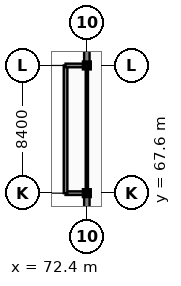
"""IFC4 building model, lengths in metres.
Left out: names, types, materials, properties, quantities, classifications, styles, units other than length and angle.
Written with IfcOpenShell. Run it as: python <this file> out.ifc"""

import sys

from ifc_helpers import new_model, si_unit, direction, frame, frame_2d, origin, origin_2d, place, context, subcontext, project, spatial, rectangle, extrude, element, fill, save


model = new_model("IFC4")
c1 = context("Model", 3, precision=1e-05, world=origin(), true_north=direction((0.0, 1.0)))
c2 = subcontext(c1, "Body", "Model", "MODEL_VIEW")
j1 = project(units=[si_unit("LENGTHUNIT", "METRE"), si_unit("PLANEANGLEUNIT", "RADIAN")], contexts=[c1])
p1 = place(None, origin())
s1 = spatial("IfcSite", under=j1, at=p1, CompositionType="ELEMENT")
p2 = place(p1, origin())
s2 = spatial("IfcBuilding", under=s1, at=p2, CompositionType="ELEMENT")
p3 = place(p2, frame((0.0, 0.0, 17.7)))
s3 = spatial("IfcBuildingStorey", under=s2, at=p3, CompositionType="ELEMENT", Elevation=17.7)
for number, where, z_axis, x_axis in (
    (1, (72.4, 67.6, 0.0), (0.0, 0.0, 1.0), (1.0, 0.0, 0.0)),
    (2, (72.4, 76.0, 0.0), (0.0, 0.0, 1.0), (1.0, 0.0, 0.0)),
):
    element("IfcColumn", number, at=place(p3, frame(where, z_axis=z_axis, x_axis=x_axis)), inside=s3, PredefinedType="COLUMN", context=c2, shape_type="SweptSolid", body=[
        extrude(rectangle(XDim=0.36, YDim=0.36, at=origin_2d()), origin(), (0.0, 0.0, 1.0), 3.9),
    ])
p4 = place(p3, frame((72.4, 67.6, 0.0), z_axis=(0.0, 0.0, 1.0), x_axis=(0.0, 1.0, 0.0)))
e3 = element("IfcWall", 3, at=p4, inside=s3, PredefinedType="PARTITIONING", context=c2, shape_type="SweptSolid", body=[
    extrude(rectangle(XDim=8.4, YDim=0.15, at=frame_2d((4.2, 0.0))), origin(), (0.0, 0.0, 1.0), 3.32),
])
p5 = place(p4, frame((3.7, 0.0, -0.01)))
e4 = element("IfcOpeningElement", 4, at=p5, cuts=e3, PredefinedType="OPENING", context=c2, shape_type="SweptSolid", body=[
    extrude(rectangle(XDim=1.0, YDim=2.16, at=frame_2d((0.5, 1.08))), frame((0.0, 0.085, 0.0), z_axis=(0.0, -1.0, 0.0), x_axis=(1.0, 0.0, 0.0)), (0.0, 0.0, 1.0), 0.17),
])
p6 = place(p3, frame((72.4, 67.6, 0.0), z_axis=(0.0, 0.0, 1.0), x_axis=(0.0, -1.0, 0.0)))
e5 = element("IfcWall", 5, at=p6, inside=s3, PredefinedType="SOLIDWALL", context=c2, shape_type="SweptSolid", body=[
    extrude(rectangle(XDim=8.4, YDim=0.36, at=frame_2d((4.2, 0.0))), origin(), (0.0, 0.0, 1.0), 3.32),
])
p7 = place(p6, frame((0.46, 0.0, 0.75)))
e6 = element("IfcOpeningElement", 6, at=p7, cuts=e5, PredefinedType="OPENING", context=c2, shape_type="SweptSolid", body=[
    extrude(rectangle(XDim=1.55, YDim=2.3, at=frame_2d((0.775, 1.15))), frame((0.0, 0.19, 0.0), z_axis=(0.0, -1.0, 0.0), x_axis=(1.0, 0.0, 0.0)), (0.0, 0.0, 1.0), 0.38),
])
p8 = place(p6, frame((6.26, 0.0, 0.75)))
e7 = element("IfcOpeningElement", 7, at=p8, cuts=e5, PredefinedType="OPENING", context=c2, shape_type="SweptSolid", body=[
    extrude(rectangle(XDim=1.55, YDim=2.3, at=frame_2d((0.775, 1.15))), frame((0.0, 0.19, 0.0), z_axis=(0.0, -1.0, 0.0), x_axis=(1.0, 0.0, 0.0)), (0.0, 0.0, 1.0), 0.38),
])
p9 = place(p3, frame((72.4, 80.8, 0.0), z_axis=(0.0, 0.0, 1.0), x_axis=(0.0, -1.0, 0.0)))
e8 = element("IfcWall", 8, at=p9, inside=s3, PredefinedType="SOLIDWALL", context=c2, shape_type="SweptSolid", body=[
    extrude(rectangle(XDim=4.8, YDim=0.36, at=frame_2d((2.4, 0.0))), origin(), (0.0, 0.0, 1.0), 3.32),
])
p10 = place(p9, frame((0.46, 0.0, 0.75)))
e9 = element("IfcOpeningElement", 9, at=p10, cuts=e8, PredefinedType="OPENING", context=c2, shape_type="SweptSolid", body=[
    extrude(rectangle(XDim=1.55, YDim=2.3, at=frame_2d((0.775, 1.15))), frame((0.0, 0.19, 0.0), z_axis=(0.0, -1.0, 0.0), x_axis=(1.0, 0.0, 0.0)), (0.0, 0.0, 1.0), 0.38),
])
p11 = place(p9, frame((2.66, 0.0, 0.75)))
e10 = element("IfcOpeningElement", 10, at=p11, cuts=e8, PredefinedType="OPENING", context=c2, shape_type="SweptSolid", body=[
    extrude(rectangle(XDim=1.55, YDim=2.3, at=frame_2d((0.775, 1.15))), frame((0.0, 0.19, 0.0), z_axis=(0.0, -1.0, 0.0), x_axis=(1.0, 0.0, 0.0)), (0.0, 0.0, 1.0), 0.38),
])
p12 = place(p3, frame((72.25, 67.6, 0.0), z_axis=(0.0, 0.0, 1.0), x_axis=(-1.0, 0.0, 0.0)))
e11 = element("IfcWall", 11, at=p12, inside=s3, PredefinedType="SOLIDWALL", context=c2, shape_type="SweptSolid", body=[
    extrude(rectangle(XDim=1.25, YDim=0.24, at=frame_2d((0.625, 0.0))), origin(), (0.0, 0.0, 1.0), 3.32),
])
p13 = place(p3, frame((71.0, 67.6, 0.0), z_axis=(0.0, 0.0, 1.0), x_axis=(0.0, 1.0, 0.0)))
e12 = element("IfcWall", 12, at=p13, inside=s3, PredefinedType="SOLIDWALL", context=c2, shape_type="SweptSolid", body=[
    extrude(rectangle(XDim=8.4, YDim=0.24, at=frame_2d((4.2, 0.0))), origin(), (0.0, 0.0, 1.0), 3.32),
])
p14 = place(p13, frame((0.46, 0.0, 0.65)))
e13 = element("IfcOpeningElement", 13, at=p14, cuts=e12, PredefinedType="OPENING", context=c2, shape_type="SweptSolid", body=[
    extrude(rectangle(XDim=2.4, YDim=2.1, at=frame_2d((1.2, 1.05))), frame((0.0, 0.13, 0.0), z_axis=(0.0, -1.0, 0.0), x_axis=(1.0, 0.0, 0.0)), (0.0, 0.0, 1.0), 0.26),
])
p15 = place(p13, frame((5.46, 0.0, 0.65)))
e14 = element("IfcOpeningElement", 14, at=p15, cuts=e12, PredefinedType="OPENING", context=c2, shape_type="SweptSolid", body=[
    extrude(rectangle(XDim=2.4, YDim=2.1, at=frame_2d((1.2, 1.05))), frame((0.0, 0.13, 0.0), z_axis=(0.0, -1.0, 0.0), x_axis=(1.0, 0.0, 0.0)), (0.0, 0.0, 1.0), 0.26),
])
p16 = place(p3, frame((71.0, 76.0, 0.0), z_axis=(0.0, 0.0, 1.0), x_axis=(1.0, 0.0, 0.0)))
e15 = element("IfcWall", 15, at=p16, inside=s3, PredefinedType="SOLIDWALL", context=c2, shape_type="SweptSolid", body=[
    extrude(rectangle(XDim=1.25, YDim=0.24, at=frame_2d((0.625, 0.0))), origin(), (0.0, 0.0, 1.0), 3.32),
])
p17 = place(p5, frame((0.0, 0.0, 0.01)))
e16 = element("IfcDoor", 16, at=p17, inside=s3, OperationType="SINGLE_SWING_LEFT", PredefinedType="DOOR", context=c2, shape_type="SweptSolid", body=[
    extrude(rectangle(XDim=1.0, YDim=2.15, at=frame_2d((0.5, 1.075))), frame((0.0, 0.025, 0.0), z_axis=(0.0, -1.0, 0.0), x_axis=(1.0, 0.0, 0.0)), (0.0, 0.0, 1.0), 0.05),
])
fill(e4, e16)
p18 = place(p7, origin())
e17 = element("IfcWindow", 17, at=p18, inside=s3, PartitioningType="DOUBLE_PANEL_HORIZONTAL", PredefinedType="WINDOW", context=c2, shape_type="SweptSolid", body=[
    extrude(rectangle(XDim=1.55, YDim=2.3, at=frame_2d((0.775, 1.15))), frame((0.0, 0.03, 0.0), z_axis=(0.0, -1.0, 0.0), x_axis=(1.0, 0.0, 0.0)), (0.0, 0.0, 1.0), 0.06),
])
fill(e6, e17)
p19 = place(p11, origin())
e18 = element("IfcWindow", 18, at=p19, inside=s3, PartitioningType="DOUBLE_PANEL_HORIZONTAL", PredefinedType="WINDOW", context=c2, shape_type="SweptSolid", body=[
    extrude(rectangle(XDim=1.55, YDim=2.3, at=frame_2d((0.775, 1.15))), frame((0.0, 0.03, 0.0), z_axis=(0.0, -1.0, 0.0), x_axis=(1.0, 0.0, 0.0)), (0.0, 0.0, 1.0), 0.06),
])
fill(e10, e18)
p20 = place(p14, origin())
e19 = element("IfcWindow", 19, at=p20, inside=s3, PartitioningType="TRIPLE_PANEL_VERTICAL", PredefinedType="WINDOW", context=c2, shape_type="SweptSolid", body=[
    extrude(rectangle(XDim=2.4, YDim=2.1, at=frame_2d((1.2, 1.05))), frame((0.0, 0.03, 0.0), z_axis=(0.0, -1.0, 0.0), x_axis=(1.0, 0.0, 0.0)), (0.0, 0.0, 1.0), 0.06),
])
fill(e13, e19)
p21 = place(p15, origin())
e20 = element("IfcWindow", 20, at=p21, inside=s3, PartitioningType="TRIPLE_PANEL_VERTICAL", PredefinedType="WINDOW", context=c2, shape_type="SweptSolid", body=[
    extrude(rectangle(XDim=2.4, YDim=2.1, at=frame_2d((1.2, 1.05))), frame((0.0, 0.03, 0.0), z_axis=(0.0, -1.0, 0.0), x_axis=(1.0, 0.0, 0.0)), (0.0, 0.0, 1.0), 0.06),
])
fill(e14, e20)
save(model, sys.argv[1])
